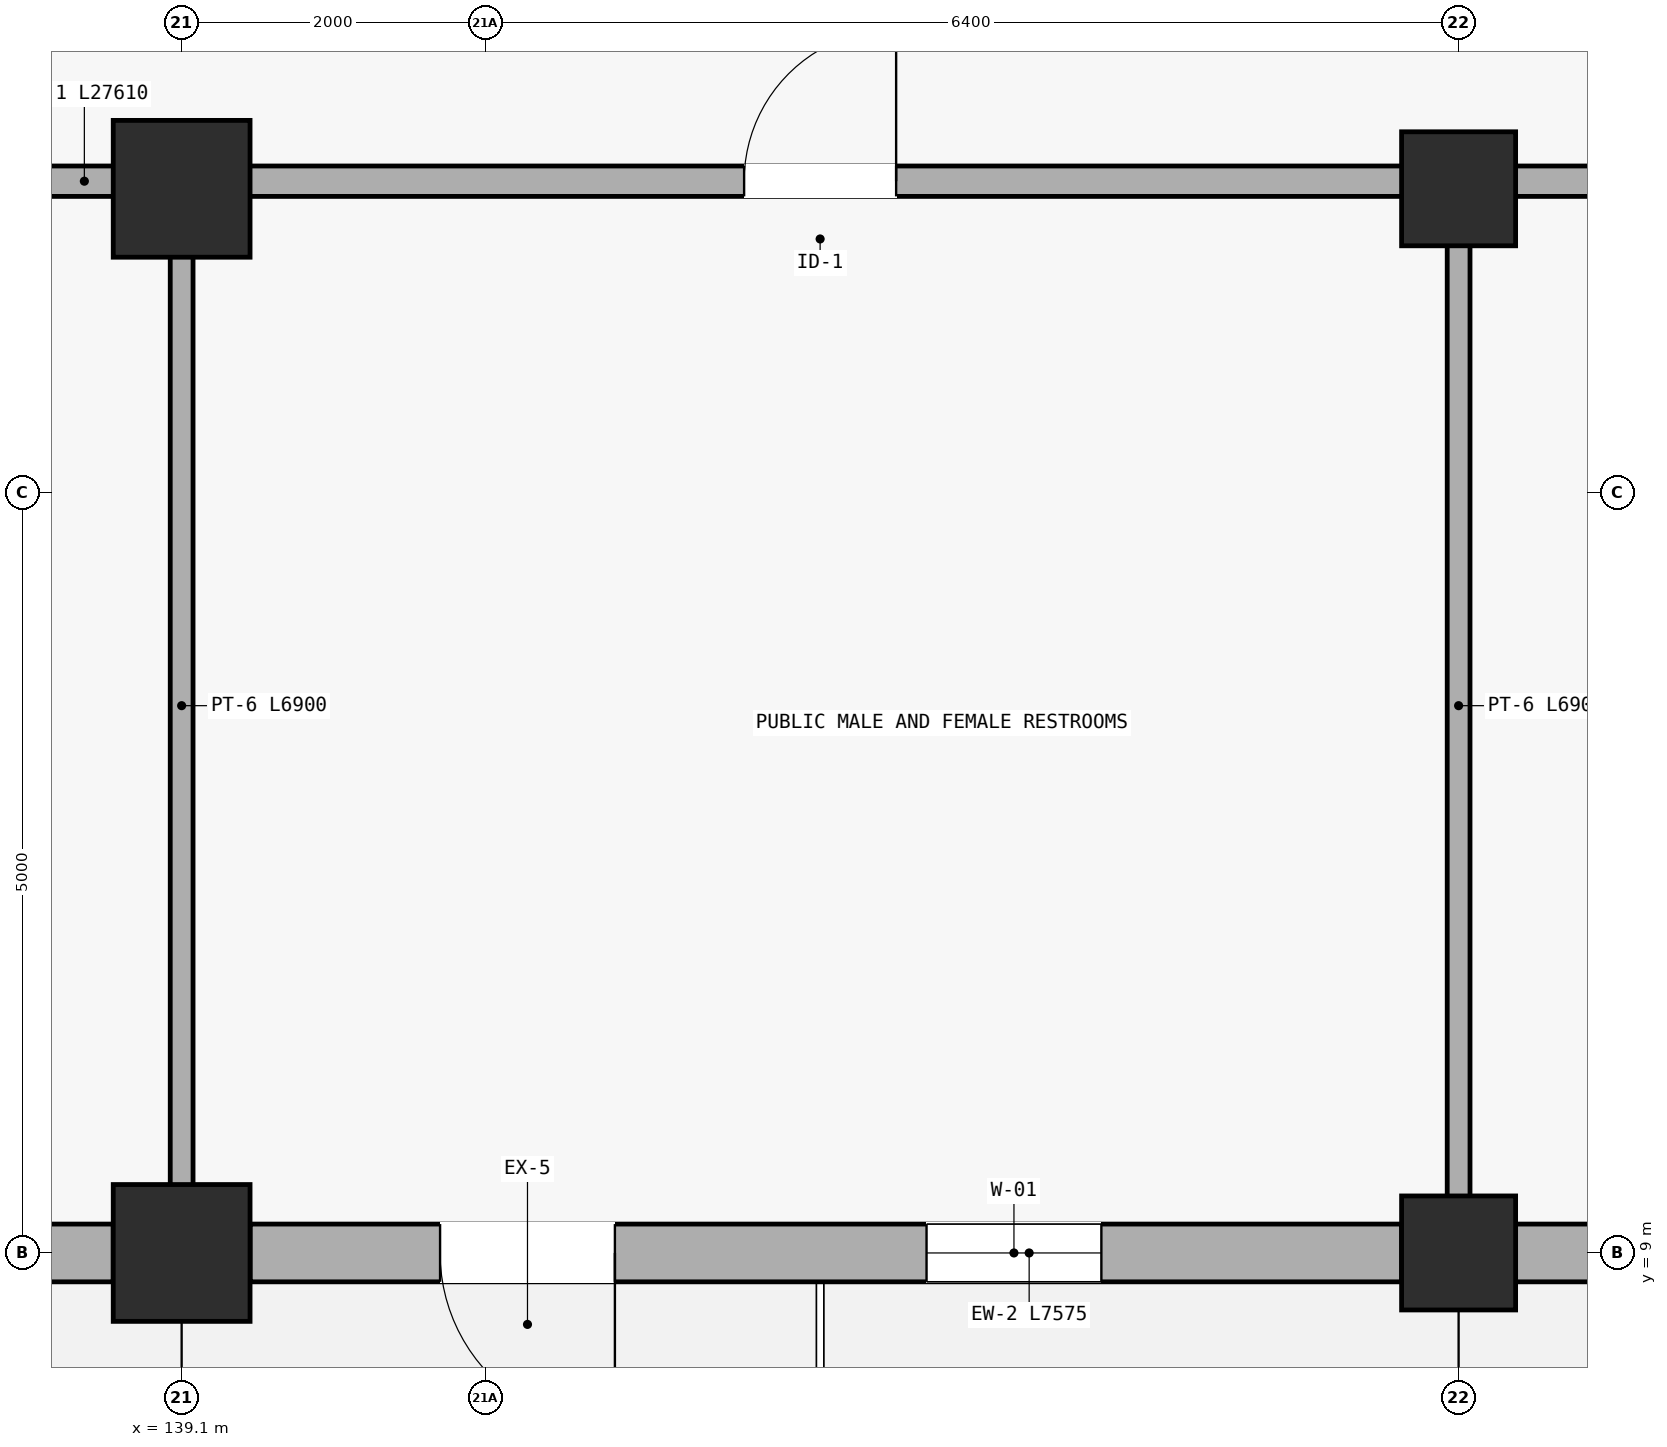
"""IFC4 building model, lengths in metres.
Left out: names, types, materials, properties, quantities, classifications, styles, units other than length and angle.
Written with IfcOpenShell. Run it as: python <this file> out.ifc"""

import sys

from ifc_helpers import new_model, si_unit, direction, frame, frame_2d, origin, origin_2d, place, context, subcontext, project, spatial, rectangle, extrude, element, fill, save


model = new_model("IFC4")
c1 = context("Model", 3, precision=1e-05, world=origin(), true_north=direction((0.0, 1.0)))
c2 = subcontext(c1, "Body", "Model", "MODEL_VIEW")
j1 = project(units=[si_unit("LENGTHUNIT", "METRE"), si_unit("PLANEANGLEUNIT", "RADIAN")], contexts=[c1])
p1 = place(None, origin())
s1 = spatial("IfcSite", under=j1, at=p1, CompositionType="ELEMENT")
p2 = place(p1, origin())
s2 = spatial("IfcBuilding", under=s1, at=p2, CompositionType="ELEMENT")
p3 = place(p2, origin())
s3 = spatial("IfcBuildingStorey", under=s2, at=p3, CompositionType="ELEMENT", Elevation=0.0)
for number, where, z_axis, x_axis in (
    (1, (139.1, 9.0, 0.0), (0.0, 0.0, 1.0), (1.0, 0.0, 0.0)),
    (2, (139.1, 16.0, 0.0), (0.0, 0.0, 1.0), (1.0, 0.0, 0.0)),
):
    element("IfcColumn", number, at=place(p3, frame(where, z_axis=z_axis, x_axis=x_axis)), inside=s3, PredefinedType="COLUMN", context=c2, shape_type="SweptSolid", body=[
        extrude(rectangle(XDim=0.9, YDim=0.9, at=origin_2d()), origin(), (0.0, 0.0, 1.0), 5.85),
    ])
for number, where, z_axis, x_axis in (
    (3, (147.5, 9.0, 0.0), (0.0, 0.0, 1.0), (1.0, 0.0, 0.0)),
    (4, (147.5, 16.0, 0.0), (0.0, 0.0, 1.0), (1.0, 0.0, 0.0)),
):
    element("IfcColumn", number, at=place(p3, frame(where, z_axis=z_axis, x_axis=x_axis)), inside=s3, PredefinedType="COLUMN", context=c2, shape_type="SweptSolid", body=[
        extrude(rectangle(XDim=0.75, YDim=0.75, at=origin_2d()), origin(), (0.0, 0.0, 1.0), 5.85),
    ])
p4 = place(p3, frame((131.075, 9.0, 0.0), z_axis=(0.0, 0.0, 1.0), x_axis=(1.0, 0.0, 0.0)))
e5 = element("IfcWall", 5, at=p4, inside=s3, PredefinedType="STANDARD", context=c2, shape_type="SweptSolid", body=[
    extrude(rectangle(XDim=7.575, YDim=0.38, at=frame_2d((3.788, 0.0))), origin(), (0.0, 0.0, 1.0), 4.75),
])
p5 = place(p4, frame((4.875, 0.0, 0.0)))
e6 = element("IfcOpeningElement", 6, at=p5, cuts=e5, PredefinedType="OPENING", context=c2, shape_type="SweptSolid", body=[
    extrude(rectangle(XDim=1.95, YDim=2.3, at=frame_2d((0.975, 1.15))), frame((0.0, 0.2, 0.0), z_axis=(0.0, -1.0, 0.0), x_axis=(1.0, 0.0, 0.0)), (0.0, 0.0, 1.0), 0.4),
])
p6 = place(p4, frame((0.825, 0.0, 0.85)))
e7 = element("IfcOpeningElement", 7, at=p6, cuts=e5, PredefinedType="OPENING", context=c2, shape_type="SweptSolid", body=[
    extrude(rectangle(XDim=1.15, YDim=1.45, at=frame_2d((0.575, 0.725))), frame((0.0, 0.2, 0.0), z_axis=(0.0, -1.0, 0.0), x_axis=(1.0, 0.0, 0.0)), (0.0, 0.0, 1.0), 0.4),
])
p7 = place(p3, frame((139.55, 9.0, 0.0), z_axis=(0.0, 0.0, 1.0), x_axis=(1.0, 0.0, 0.0)))
e8 = element("IfcWall", 8, at=p7, inside=s3, PredefinedType="STANDARD", context=c2, shape_type="SweptSolid", body=[
    extrude(rectangle(XDim=7.575, YDim=0.38, at=frame_2d((3.788, 0.0))), origin(), (0.0, 0.0, 1.0), 4.75),
])
p8 = place(p7, frame((1.25, 0.0, 0.0)))
e9 = element("IfcOpeningElement", 9, at=p8, cuts=e8, PredefinedType="OPENING", context=c2, shape_type="SweptSolid", body=[
    extrude(rectangle(XDim=1.15, YDim=2.15, at=frame_2d((0.575, 1.075))), frame((0.0, 0.2, 0.0), z_axis=(0.0, -1.0, 0.0), x_axis=(1.0, 0.0, 0.0)), (0.0, 0.0, 1.0), 0.4),
])
p9 = place(p7, frame((4.45, 0.0, 0.85)))
e10 = element("IfcOpeningElement", 10, at=p9, cuts=e8, PredefinedType="OPENING", context=c2, shape_type="SweptSolid", body=[
    extrude(rectangle(XDim=1.15, YDim=1.45, at=frame_2d((0.575, 0.725))), frame((0.0, 0.2, 0.0), z_axis=(0.0, -1.0, 0.0), x_axis=(1.0, 0.0, 0.0)), (0.0, 0.0, 1.0), 0.4),
])
p10 = place(p3, frame((147.875, 9.0, 0.0), z_axis=(0.0, 0.0, 1.0), x_axis=(1.0, 0.0, 0.0)))
e11 = element("IfcWall", 11, at=p10, inside=s3, PredefinedType="STANDARD", context=c2, shape_type="SweptSolid", body=[
    extrude(rectangle(XDim=7.575, YDim=0.38, at=frame_2d((3.788, 0.0))), origin(), (0.0, 0.0, 1.0), 4.75),
])
p11 = place(p10, frame((0.875, 0.0, 0.75)))
e12 = element("IfcOpeningElement", 12, at=p11, cuts=e11, PredefinedType="OPENING", context=c2, shape_type="SweptSolid", body=[
    extrude(rectangle(XDim=2.2, YDim=1.45, at=frame_2d((1.1, 0.725))), frame((0.0, 0.2, 0.0), z_axis=(0.0, -1.0, 0.0), x_axis=(1.0, 0.0, 0.0)), (0.0, 0.0, 1.0), 0.4),
])
p12 = place(p10, frame((5.375, 0.0, 0.75)))
e13 = element("IfcOpeningElement", 13, at=p12, cuts=e11, PredefinedType="OPENING", context=c2, shape_type="SweptSolid", body=[
    extrude(rectangle(XDim=1.5, YDim=1.4, at=frame_2d((0.75, 0.7))), frame((0.0, 0.2, 0.0), z_axis=(0.0, -1.0, 0.0), x_axis=(1.0, 0.0, 0.0)), (0.0, 0.0, 1.0), 0.4),
])
p13 = place(p3, frame((128.14, 16.05, 0.0), z_axis=(0.0, 0.0, 1.0), x_axis=(1.0, 0.0, 0.0)))
e14 = element("IfcWall", 14, at=p13, inside=s3, PredefinedType="PARTITIONING", context=c2, shape_type="SweptSolid", body=[
    extrude(rectangle(XDim=10.96, YDim=0.2, at=frame_2d((5.48, 0.0))), origin(), (0.0, 0.0, 1.0), 4.19),
])
p14 = place(p13, frame((4.98, 0.0, 0.0)))
e15 = element("IfcOpeningElement", 15, at=p14, cuts=e14, PredefinedType="OPENING", context=c2, shape_type="SweptSolid", body=[
    extrude(rectangle(XDim=1.0, YDim=2.12, at=frame_2d((0.5, 1.06))), frame((0.0, 0.11, 0.0), z_axis=(0.0, -1.0, 0.0), x_axis=(1.0, 0.0, 0.0)), (0.0, 0.0, 1.0), 0.22),
])
p15 = place(p3, frame((139.1, 16.05, 0.0), z_axis=(0.0, 0.0, 1.0), x_axis=(1.0, 0.0, 0.0)))
e16 = element("IfcWall", 16, at=p15, inside=s3, PredefinedType="PARTITIONING", context=c2, shape_type="SweptSolid", body=[
    extrude(rectangle(XDim=8.4, YDim=0.2, at=frame_2d((4.2, 0.0))), origin(), (0.0, 0.0, 1.0), 4.19),
])
p16 = place(p15, frame((3.7, 0.0, 0.0)))
e17 = element("IfcOpeningElement", 17, at=p16, cuts=e16, PredefinedType="OPENING", context=c2, shape_type="SweptSolid", body=[
    extrude(rectangle(XDim=1.0, YDim=2.12, at=frame_2d((0.5, 1.06))), frame((0.0, 0.11, 0.0), z_axis=(0.0, -1.0, 0.0), x_axis=(1.0, 0.0, 0.0)), (0.0, 0.0, 1.0), 0.22),
])
p17 = place(p3, frame((147.5, 16.05, 0.0), z_axis=(0.0, 0.0, 1.0), x_axis=(1.0, 0.0, 0.0)))
e18 = element("IfcWall", 18, at=p17, inside=s3, PredefinedType="PARTITIONING", context=c2, shape_type="SweptSolid", body=[
    extrude(rectangle(XDim=4.3, YDim=0.2, at=frame_2d((2.15, 0.0))), origin(), (0.0, 0.0, 1.0), 4.19),
])
for number, where, z_axis, x_axis in (
    (19, (139.1, 9.15, 0.0), (0.0, 0.0, 1.0), (0.0, 1.0, 0.0)),
    (20, (147.5, 9.15, 0.0), (0.0, 0.0, 1.0), (0.0, 1.0, 0.0)),
):
    element("IfcWall", number, at=place(p3, frame(where, z_axis=z_axis, x_axis=x_axis)), inside=s3, PredefinedType="PARTITIONING", context=c2, shape_type="SweptSolid", body=[
        extrude(rectangle(XDim=6.9, YDim=0.15, at=frame_2d((3.45, 0.0))), origin(), (0.0, 0.0, 1.0), 4.19),
    ])
p18 = place(p8, frame((1.15, 0.0, 0.0), z_axis=(0.0, 0.0, 1.0), x_axis=(-1.0, 0.0, 0.0)))
e21 = element("IfcDoor", 21, at=p18, inside=s3, OperationType="SINGLE_SWING_RIGHT", PredefinedType="DOOR", context=c2, shape_type="SweptSolid", body=[
    extrude(rectangle(XDim=1.15, YDim=2.15, at=frame_2d((0.575, 1.075))), frame((0.0, 0.025, 0.0), z_axis=(0.0, -1.0, 0.0), x_axis=(1.0, 0.0, 0.0)), (0.0, 0.0, 1.0), 0.05),
])
fill(e9, e21)
p19 = place(p9, origin())
e22 = element("IfcWindow", 22, at=p19, inside=s3, PartitioningType="SINGLE_PANEL", PredefinedType="WINDOW", context=c2, shape_type="SweptSolid", body=[
    extrude(rectangle(XDim=1.15, YDim=1.45, at=frame_2d((0.575, 0.725))), frame((0.0, 0.03, 0.0), z_axis=(0.0, -1.0, 0.0), x_axis=(1.0, 0.0, 0.0)), (0.0, 0.0, 1.0), 0.06),
])
fill(e10, e22)
p20 = place(p16, origin())
e23 = element("IfcDoor", 23, at=p20, inside=s3, OperationType="SINGLE_SWING_RIGHT", PredefinedType="DOOR", context=c2, shape_type="SweptSolid", body=[
    extrude(rectangle(XDim=1.0, YDim=2.12, at=frame_2d((0.5, 1.06))), frame((0.0, 0.025, 0.0), z_axis=(0.0, -1.0, 0.0), x_axis=(1.0, 0.0, 0.0)), (0.0, 0.0, 1.0), 0.05),
])
fill(e17, e23)
save(model, sys.argv[1])
